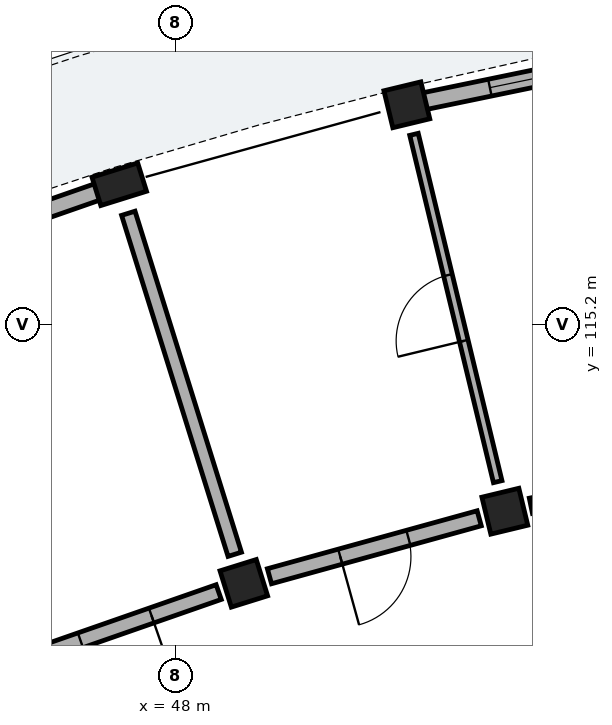
"""IFC4 building model, lengths in metres.
Left out: names, types, materials, properties, quantities, classifications, styles, units other than length and angle.
Written with IfcOpenShell. Run it as: python <this file> out.ifc"""

import sys

from ifc_helpers import new_model, si_unit, direction, frame, frame_2d, origin, origin_2d, place, context, subcontext, project, spatial, rectangle, extrude, element, fill, save


model = new_model("IFC4")
c1 = context("Model", 3, precision=1e-05, world=origin(), true_north=direction((0.0, 1.0)))
c2 = subcontext(c1, "Body", "Model", "MODEL_VIEW")
j1 = project(units=[si_unit("LENGTHUNIT", "METRE"), si_unit("PLANEANGLEUNIT", "RADIAN")], contexts=[c1])
p1 = place(None, origin())
s1 = spatial("IfcSite", under=j1, at=p1, CompositionType="ELEMENT")
p2 = place(p1, origin())
s2 = spatial("IfcBuilding", under=s1, at=p2, CompositionType="ELEMENT")
p3 = place(p2, frame((0.0, 0.0, 32.36)))
s3 = spatial("IfcBuildingStorey", under=s2, at=p3, CompositionType="ELEMENT", Elevation=32.36)
for number, where, z_axis, x_axis in (
    (1, (52.331, 112.744, 0.0), (0.0, 0.0, 1.0), (-0.234, 0.972, 0.0)),
    (2, (51.042, 118.091, 0.0), (0.0, 0.0, 1.0), (-0.234, 0.972, 0.0)),
    (3, (48.897, 111.795, 0.0), (0.0, 0.0, 1.0), (-0.298, 0.955, 0.0)),
):
    element("IfcColumn", number, at=place(p3, frame(where, z_axis=z_axis, x_axis=x_axis)), inside=s3, PredefinedType="COLUMN", context=c2, shape_type="SweptSolid", body=[
        extrude(rectangle(XDim=0.5, YDim=0.5, at=origin_2d()), origin(), (0.0, 0.0, 1.0), 3.115),
    ])
p4 = place(p3, frame((47.258, 117.046, 0.0), z_axis=(0.0, 0.0, 1.0), x_axis=(-0.297930292146, 0.954587628781, 0.0)))
e4 = element("IfcColumn", 4, at=p4, inside=s3, PredefinedType="PILASTER", context=c2, shape_type="SweptSolid", body=[
    extrude(rectangle(XDim=0.39, YDim=0.63, at=origin_2d()), origin(), (0.0, 0.0, 1.0), 3.115),
])
p5 = place(p3, frame((54.725, 118.852, 0.0), z_axis=(0.0, 0.0, 1.0), x_axis=(-0.979336300967, -0.202238496848, 0.0)))
e5 = element("IfcWall", 5, at=p5, inside=s3, PredefinedType="SOLIDWALL", context=c2, shape_type="SweptSolid", body=[
    extrude(rectangle(XDim=3.541, YDim=0.225, at=frame_2d((1.771, 0.0))), origin(), (0.0, 0.0, 1.0), 2.355),
])
p6 = place(p5, frame((0.895, 0.0, 0.35)))
e6 = element("IfcOpeningElement", 6, at=p6, cuts=e5, PredefinedType="OPENING", context=c2, shape_type="SweptSolid", body=[
    extrude(rectangle(XDim=1.75, YDim=1.85, at=frame_2d((0.875, 0.925))), frame((0.0, 0.123, 0.0), z_axis=(0.0, -1.0, 0.0), x_axis=(1.0, 0.0, 0.0)), (0.0, 0.0, 1.0), 0.245),
])
p7 = place(p3, frame((47.103, 116.991, 0.0), z_axis=(0.0, 0.0, 1.0), x_axis=(-0.944250036963, -0.329229202373, 0.0)))
e7 = element("IfcWall", 7, at=p7, inside=s3, PredefinedType="SOLIDWALL", context=c2, shape_type="SweptSolid", body=[
    extrude(rectangle(XDim=3.541, YDim=0.225, at=frame_2d((1.771, 0.0))), origin(), (0.0, 0.0, 1.0), 2.355),
])
p8 = place(p7, frame((1.26, 0.0, 0.0)))
e8 = element("IfcOpeningElement", 8, at=p8, cuts=e7, PredefinedType="OPENING", context=c2, shape_type="SweptSolid", body=[
    extrude(rectangle(XDim=1.02, YDim=2.14, at=frame_2d((0.51, 1.07))), frame((0.0, 0.123, 0.0), z_axis=(0.0, -1.0, 0.0), x_axis=(1.0, 0.0, 0.0)), (0.0, 0.0, 1.0), 0.245),
])
p9 = place(p3, frame((55.478, 113.394, 0.0), z_axis=(0.0, 0.0, 1.0), x_axis=(-0.979348418612, -0.202179808492, 0.0)))
e9 = element("IfcWall", 9, at=p9, inside=s3, PredefinedType="PARTITIONING", context=c2, shape_type="SweptSolid", body=[
    extrude(rectangle(XDim=2.863, YDim=0.205, at=frame_2d((1.432, 0.0))), origin(), (0.0, 0.0, 1.0), 2.37),
])
p10 = place(p9, frame((0.957, 0.0, 0.0)))
e10 = element("IfcOpeningElement", 10, at=p10, cuts=e9, PredefinedType="OPENING", context=c2, shape_type="SweptSolid", body=[
    extrude(rectangle(XDim=0.95, YDim=2.13, at=frame_2d((0.475, 1.065))), frame((0.0, 0.113, 0.0), z_axis=(0.0, -1.0, 0.0), x_axis=(1.0, 0.0, 0.0)), (0.0, 0.0, 1.0), 0.225),
])
p11 = place(p3, frame((52.238, 113.133, 0.0), z_axis=(0.0, 0.0, 1.0), x_axis=(-0.234386624934, 0.972143461662, 0.0)))
e11 = element("IfcWall", 11, at=p11, inside=s3, PredefinedType="PARTITIONING", context=c2, shape_type="SweptSolid", body=[
    extrude(rectangle(XDim=4.7, YDim=0.115, at=frame_2d((2.35, 0.0))), origin(), (0.0, 0.0, 1.0), 2.37),
])
p12 = place(p11, frame((1.905, 0.0, 0.0)))
e12 = element("IfcOpeningElement", 12, at=p12, cuts=e11, PredefinedType="OPENING", context=c2, shape_type="SweptSolid", body=[
    extrude(rectangle(XDim=0.89, YDim=2.1, at=frame_2d((0.445, 1.05))), frame((0.0, 0.067, 0.0), z_axis=(0.0, -1.0, 0.0), x_axis=(1.0, 0.0, 0.0)), (0.0, 0.0, 1.0), 0.135),
])
p13 = place(p3, frame((51.994, 112.651, 0.0), z_axis=(0.0, 0.0, 1.0), x_axis=(-0.963890789093, -0.266297853356, 0.0)))
e13 = element("IfcWall", 13, at=p13, inside=s3, PredefinedType="PARTITIONING", context=c2, shape_type="SweptSolid", body=[
    extrude(rectangle(XDim=2.863, YDim=0.205, at=frame_2d((1.432, 0.0))), origin(), (0.0, 0.0, 1.0), 2.37),
])
p14 = place(p13, frame((0.967, 0.0, 0.0)))
e14 = element("IfcOpeningElement", 14, at=p14, cuts=e13, PredefinedType="OPENING", context=c2, shape_type="SweptSolid", body=[
    extrude(rectangle(XDim=0.93, YDim=2.12, at=frame_2d((0.465, 1.06))), frame((0.0, 0.113, 0.0), z_axis=(0.0, -1.0, 0.0), x_axis=(1.0, 0.0, 0.0)), (0.0, 0.0, 1.0), 0.225),
])
p15 = place(p3, frame((48.778, 112.177, 0.0), z_axis=(0.0, 0.0, 1.0), x_axis=(-0.297905254614, 0.954595442726, 0.0)))
e15 = element("IfcWall", 15, at=p15, inside=s3, PredefinedType="PARTITIONING", context=c2, shape_type="SweptSolid", body=[
    extrude(rectangle(XDim=4.7, YDim=0.185, at=frame_2d((2.35, 0.0))), origin(), (0.0, 0.0, 1.0), 2.37),
])
p16 = place(p3, frame((48.566, 111.68, 0.0), z_axis=(0.0, 0.0, 1.0), x_axis=(-0.944253820929, -0.329218349522, 0.0)))
e16 = element("IfcWall", 16, at=p16, inside=s3, PredefinedType="PARTITIONING", context=c2, shape_type="SweptSolid", body=[
    extrude(rectangle(XDim=2.863, YDim=0.205, at=frame_2d((1.432, 0.0))), origin(), (0.0, 0.0, 1.0), 2.37),
])
p17 = place(p16, frame((0.937, 0.0, 0.0)))
e17 = element("IfcOpeningElement", 17, at=p17, cuts=e16, PredefinedType="OPENING", context=c2, shape_type="SweptSolid", body=[
    extrude(rectangle(XDim=0.99, YDim=2.16, at=frame_2d((0.495, 1.08))), frame((0.0, 0.113, 0.0), z_axis=(0.0, -1.0, 0.0), x_axis=(1.0, 0.0, 0.0)), (0.0, 0.0, 1.0), 0.225),
])
p18 = place(p6, origin())
e18 = element("IfcWindow", 18, at=p18, inside=s3, PartitioningType="SINGLE_PANEL", PredefinedType="WINDOW", context=c2, shape_type="SweptSolid", body=[
    extrude(rectangle(XDim=1.75, YDim=1.85, at=frame_2d((0.875, 0.925))), frame((0.0, 0.03, 0.0), z_axis=(0.0, -1.0, 0.0), x_axis=(1.0, 0.0, 0.0)), (0.0, 0.0, 1.0), 0.06),
])
fill(e6, e18)
p19 = place(p12, origin())
e19 = element("IfcDoor", 19, at=p19, inside=s3, OperationType="SINGLE_SWING_LEFT", PredefinedType="DOOR", context=c2, shape_type="SweptSolid", body=[
    extrude(rectangle(XDim=0.89, YDim=2.1, at=frame_2d((0.445, 1.05))), frame((0.0, 0.025, 0.0), z_axis=(0.0, -1.0, 0.0), x_axis=(1.0, 0.0, 0.0)), (0.0, 0.0, 1.0), 0.05),
])
fill(e12, e19)
p20 = place(p14, origin())
e20 = element("IfcDoor", 20, at=p20, inside=s3, OperationType="SINGLE_SWING_RIGHT", PredefinedType="DOOR", context=c2, shape_type="SweptSolid", body=[
    extrude(rectangle(XDim=0.93, YDim=2.12, at=frame_2d((0.465, 1.06))), frame((0.0, 0.025, 0.0), z_axis=(0.0, -1.0, 0.0), x_axis=(1.0, 0.0, 0.0)), (0.0, 0.0, 1.0), 0.05),
])
fill(e14, e20)
p21 = place(p17, origin())
e21 = element("IfcDoor", 21, at=p21, inside=s3, OperationType="SINGLE_SWING_LEFT", PredefinedType="DOOR", context=c2, shape_type="SweptSolid", body=[
    extrude(rectangle(XDim=0.99, YDim=2.16, at=frame_2d((0.495, 1.08))), frame((0.0, 0.025, 0.0), z_axis=(0.0, -1.0, 0.0), x_axis=(1.0, 0.0, 0.0)), (0.0, 0.0, 1.0), 0.05),
])
fill(e17, e21)
save(model, sys.argv[1])
